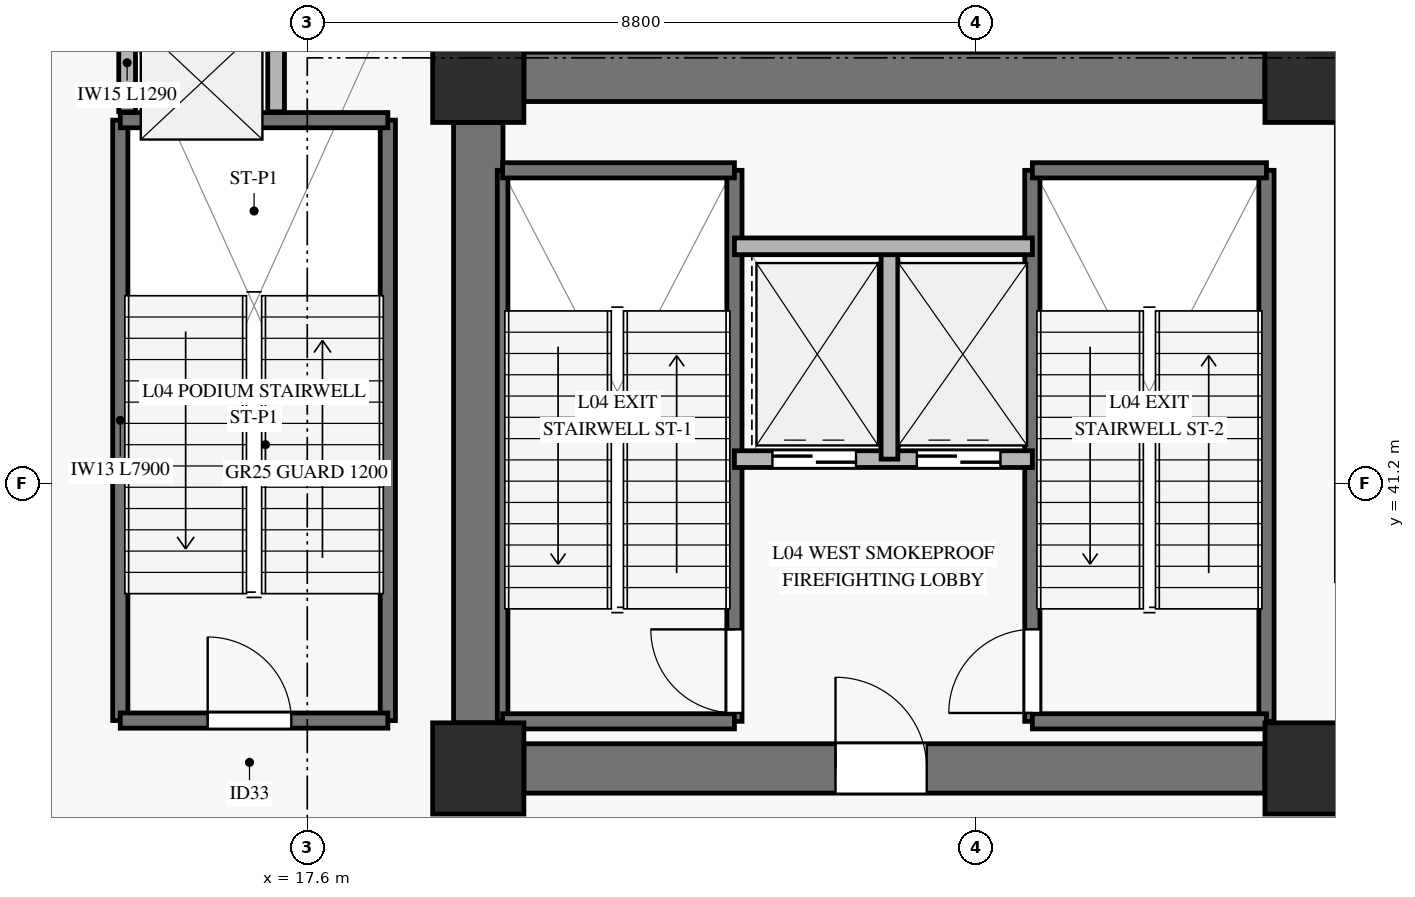
"""IFC4 building model, lengths in metres.
Left out: names, types, materials, properties, quantities, classifications, styles, units other than length and angle.
Written with IfcOpenShell. Run it as: python <this file> out.ifc"""

import sys

from ifc_helpers import new_model, si_unit, direction, frame, frame_2d, origin, origin_2d, place, context, subcontext, project, spatial, rectangle, extrude, source, transform, mapped, element, fill, save


model = new_model("IFC4")
c1 = context("Model", 3, precision=1e-05, world=origin(), true_north=direction((0.0, 1.0)))
c2 = subcontext(c1, "Body", "Model", "MODEL_VIEW")
j1 = project(units=[si_unit("LENGTHUNIT", "METRE"), si_unit("PLANEANGLEUNIT", "RADIAN")], contexts=[c1])
p1 = place(None, origin())
s1 = spatial("IfcSite", under=j1, at=p1, CompositionType="ELEMENT")
p2 = place(p1, origin())
s2 = spatial("IfcBuilding", under=s1, at=p2, CompositionType="ELEMENT")
p3 = place(p2, frame((0.0, 0.0, 15.2)))
s3 = spatial("IfcBuildingStorey", under=s2, at=p3, CompositionType="ELEMENT", Elevation=15.2)
m1 = source(origin(), c2, "Body", "SweptSolid", [
    extrude(rectangle(XDim=1.2, YDim=1.2, at=origin_2d()), origin(), (0.0, 0.0, 1.0), 4.65),
])
for number, where, z_axis, x_axis in (
    (1, (19.85, 37.45, 0.0), (0.0, 0.0, 1.0), (1.0, 0.0, 0.0)),
    (2, (19.85, 46.55, 0.0), (0.0, 0.0, 1.0), (1.0, 0.0, 0.0)),
    (3, (30.8, 37.45, 0.0), (0.0, 0.0, 1.0), (1.0, 0.0, 0.0)),
    (4, (30.8, 46.55, 0.0), (0.0, 0.0, 1.0), (1.0, 0.0, 0.0)),
):
    element("IfcColumn", number, at=place(p3, frame(where, z_axis=z_axis, x_axis=x_axis)), inside=s3, PredefinedType="PILASTER", context=c2, shape_type="MappedRepresentation", body=[
        mapped(m1, transform((0.0, 0.0, 0.0), x_axis=(1.0, 0.0, 0.0), y_axis=(0.0, 1.0, 0.0), z_axis=(0.0, 0.0, 1.0), scale=1.0)),
    ])
p4 = place(p3, frame((20.45, 46.55, 0.0), z_axis=(0.0, 0.0, 1.0), x_axis=(1.0, 0.0, 0.0)))
e5 = element("IfcWall", 5, at=p4, inside=s3, PredefinedType="SHEAR", context=c2, shape_type="SweptSolid", body=[
    extrude(rectangle(XDim=9.75, YDim=0.65, at=frame_2d((4.875, 0.0))), origin(), (0.0, 0.0, 1.0), 4.65),
])
p5 = place(p3, frame((20.45, 37.45, 0.0), z_axis=(0.0, 0.0, 1.0), x_axis=(1.0, 0.0, 0.0)))
e6 = element("IfcWall", 6, at=p5, inside=s3, PredefinedType="SHEAR", context=c2, shape_type="SweptSolid", body=[
    extrude(rectangle(XDim=9.75, YDim=0.65, at=frame_2d((4.875, 0.0))), origin(), (0.0, 0.0, 1.0), 4.65),
])
p6 = place(p5, frame((4.1, 0.0, 0.0)))
e7 = element("IfcOpeningElement", 7, at=p6, cuts=e6, PredefinedType="OPENING", context=c2, shape_type="SweptSolid", body=[
    extrude(rectangle(XDim=1.2, YDim=2.15, at=frame_2d((0.6, 1.075))), frame((0.0, 0.335, 0.0), z_axis=(0.0, -1.0, 0.0), x_axis=(1.0, 0.0, 0.0)), (0.0, 0.0, 1.0), 0.67),
])
p7 = place(p3, frame((19.85, 38.05, 0.0), z_axis=(0.0, 0.0, 1.0), x_axis=(0.0, 1.0, 0.0)))
e8 = element("IfcWall", 8, at=p7, inside=s3, PredefinedType="SHEAR", context=c2, shape_type="SweptSolid", body=[
    extrude(rectangle(XDim=7.9, YDim=0.65, at=frame_2d((3.95, 0.0))), origin(), (0.0, 0.0, 1.0), 4.65),
])
p8 = place(p3, frame((20.17, 38.07, 0.0), z_axis=(0.0, 0.0, 1.0), x_axis=(0.0, 1.0, 0.0)))
e9 = element("IfcWall", 9, at=p8, inside=s3, PredefinedType="SOLIDWALL", context=c2, shape_type="SweptSolid", body=[
    extrude(rectangle(XDim=7.25, YDim=0.14, at=frame_2d((3.625, 0.0))), origin(), (0.0, 0.0, 1.0), 5.0),
])
p9 = place(p3, frame((23.22, 38.07, 0.0), z_axis=(0.0, 0.0, 1.0), x_axis=(0.0, 1.0, 0.0)))
e10 = element("IfcWall", 10, at=p9, inside=s3, PredefinedType="SOLIDWALL", context=c2, shape_type="SweptSolid", body=[
    extrude(rectangle(XDim=7.25, YDim=0.2, at=frame_2d((3.625, 0.0))), origin(), (0.0, 0.0, 1.0), 5.0),
])
p10 = place(p9, frame((0.11, 0.0, 0.0)))
e11 = element("IfcOpeningElement", 11, at=p10, cuts=e10, PredefinedType="OPENING", context=c2, shape_type="SweptSolid", body=[
    extrude(rectangle(XDim=1.1, YDim=2.15, at=frame_2d((0.55, 1.075))), frame((0.0, 0.11, 0.0), z_axis=(0.0, -1.0, 0.0), x_axis=(1.0, 0.0, 0.0)), (0.0, 0.0, 1.0), 0.22),
])
for number, where, z_axis, x_axis in (
    (12, (20.17, 45.32, 0.0), (0.0, 0.0, 1.0), (1.0, 0.0, 0.0)),
    (13, (20.17, 38.07, 0.0), (0.0, 0.0, 1.0), (1.0, 0.0, 0.0)),
):
    element("IfcWall", number, at=place(p3, frame(where, z_axis=z_axis, x_axis=x_axis)), inside=s3, PredefinedType="SOLIDWALL", context=c2, shape_type="SweptSolid", body=[
        extrude(rectangle(XDim=3.05, YDim=0.2, at=frame_2d((1.525, 0.0))), origin(), (0.0, 0.0, 1.0), 5.0),
    ])
p11 = place(p3, frame((27.14, 38.07, 0.0), z_axis=(0.0, 0.0, 1.0), x_axis=(0.0, 1.0, 0.0)))
e14 = element("IfcWall", 14, at=p11, inside=s3, PredefinedType="SOLIDWALL", context=c2, shape_type="SweptSolid", body=[
    extrude(rectangle(XDim=7.25, YDim=0.2, at=frame_2d((3.625, 0.0))), origin(), (0.0, 0.0, 1.0), 5.0),
])
p12 = place(p11, frame((0.11, 0.0, 0.0)))
e15 = element("IfcOpeningElement", 15, at=p12, cuts=e14, PredefinedType="OPENING", context=c2, shape_type="SweptSolid", body=[
    extrude(rectangle(XDim=1.1, YDim=2.15, at=frame_2d((0.55, 1.075))), frame((0.0, 0.11, 0.0), z_axis=(0.0, -1.0, 0.0), x_axis=(1.0, 0.0, 0.0)), (0.0, 0.0, 1.0), 0.22),
])
p13 = place(p3, frame((30.22, 38.07, 0.0), z_axis=(0.0, 0.0, 1.0), x_axis=(0.0, 1.0, 0.0)))
e16 = element("IfcWall", 16, at=p13, inside=s3, PredefinedType="SOLIDWALL", context=c2, shape_type="SweptSolid", body=[
    extrude(rectangle(XDim=7.25, YDim=0.2, at=frame_2d((3.625, 0.0))), origin(), (0.0, 0.0, 1.0), 5.0),
])
for number, where, z_axis, x_axis in (
    (17, (27.14, 45.32, 0.0), (0.0, 0.0, 1.0), (1.0, 0.0, 0.0)),
    (18, (27.14, 38.07, 0.0), (0.0, 0.0, 1.0), (1.0, 0.0, 0.0)),
):
    element("IfcWall", number, at=place(p3, frame(where, z_axis=z_axis, x_axis=x_axis)), inside=s3, PredefinedType="SOLIDWALL", context=c2, shape_type="SweptSolid", body=[
        extrude(rectangle(XDim=3.08, YDim=0.2, at=frame_2d((1.54, 0.0))), origin(), (0.0, 0.0, 1.0), 5.0),
    ])
p14 = place(p3, frame((23.22, 41.52, 0.0), z_axis=(0.0, 0.0, 1.0), x_axis=(1.0, 0.0, 0.0)))
e19 = element("IfcWall", 19, at=p14, inside=s3, PredefinedType="SOLIDWALL", context=c2, shape_type="SweptSolid", body=[
    extrude(rectangle(XDim=3.92, YDim=0.22, at=frame_2d((1.96, 0.0))), origin(), (0.0, 0.0, 1.0), 4.65),
])
p15 = place(p14, frame((0.5, 0.0, 0.0)))
e20 = element("IfcOpeningElement", 20, at=p15, cuts=e19, PredefinedType="OPENING", context=c2, shape_type="SweptSolid", body=[
    extrude(rectangle(XDim=1.1, YDim=2.2, at=frame_2d((0.55, 1.1))), frame((0.0, 0.12, 0.0), z_axis=(0.0, -1.0, 0.0), x_axis=(1.0, 0.0, 0.0)), (0.0, 0.0, 1.0), 0.24),
])
p16 = place(p14, frame((2.4, 0.0, 0.0)))
e21 = element("IfcOpeningElement", 21, at=p16, cuts=e19, PredefinedType="OPENING", context=c2, shape_type="SweptSolid", body=[
    extrude(rectangle(XDim=1.1, YDim=2.2, at=frame_2d((0.55, 1.1))), frame((0.0, 0.12, 0.0), z_axis=(0.0, -1.0, 0.0), x_axis=(1.0, 0.0, 0.0)), (0.0, 0.0, 1.0), 0.24),
])
p17 = place(p3, frame((25.26, 41.52, 0.0), z_axis=(0.0, 0.0, 1.0), x_axis=(0.0, 1.0, 0.0)))
e22 = element("IfcWall", 22, at=p17, inside=s3, PredefinedType="SOLIDWALL", context=c2, shape_type="SweptSolid", body=[
    extrude(rectangle(XDim=2.8, YDim=0.22, at=frame_2d((1.4, 0.0))), origin(), (0.0, 0.0, 1.0), 4.65),
])
p18 = place(p3, frame((23.22, 44.32, 0.0), z_axis=(0.0, 0.0, 1.0), x_axis=(1.0, 0.0, 0.0)))
e23 = element("IfcWall", 23, at=p18, inside=s3, PredefinedType="SOLIDWALL", context=c2, shape_type="SweptSolid", body=[
    extrude(rectangle(XDim=3.92, YDim=0.22, at=frame_2d((1.96, 0.0))), origin(), (0.0, 0.0, 1.0), 4.65),
])
for number, where, z_axis, x_axis in (
    (24, (15.14, 38.08, 0.0), (0.0, 0.0, 1.0), (0.0, 1.0, 0.0)),
    (25, (18.66, 38.08, 0.0), (0.0, 0.0, 1.0), (0.0, 1.0, 0.0)),
):
    element("IfcWall", number, at=place(p3, frame(where, z_axis=z_axis, x_axis=x_axis)), inside=s3, PredefinedType="SOLIDWALL", context=c2, shape_type="SweptSolid", body=[
        extrude(rectangle(XDim=7.9, YDim=0.2, at=frame_2d((3.95, 0.0))), origin(), (0.0, 0.0, 1.0), 5.0),
    ])
p19 = place(p3, frame((15.14, 45.98, 0.0), z_axis=(0.0, 0.0, 1.0), x_axis=(1.0, 0.0, 0.0)))
e26 = element("IfcWall", 26, at=p19, inside=s3, PredefinedType="SOLIDWALL", context=c2, shape_type="SweptSolid", body=[
    extrude(rectangle(XDim=3.52, YDim=0.2, at=frame_2d((1.76, 0.0))), origin(), (0.0, 0.0, 1.0), 5.0),
])
p20 = place(p3, frame((15.14, 38.08, 0.0), z_axis=(0.0, 0.0, 1.0), x_axis=(1.0, 0.0, 0.0)))
e27 = element("IfcWall", 27, at=p20, inside=s3, PredefinedType="SOLIDWALL", context=c2, shape_type="SweptSolid", body=[
    extrude(rectangle(XDim=3.52, YDim=0.2, at=frame_2d((1.76, 0.0))), origin(), (0.0, 0.0, 1.0), 5.0),
])
p21 = place(p20, frame((1.15, 0.0, 0.0)))
e28 = element("IfcOpeningElement", 28, at=p21, cuts=e27, PredefinedType="OPENING", context=c2, shape_type="SweptSolid", body=[
    extrude(rectangle(XDim=1.1, YDim=2.15, at=frame_2d((0.55, 1.075))), frame((0.0, 0.11, 0.0), z_axis=(0.0, -1.0, 0.0), x_axis=(1.0, 0.0, 0.0)), (0.0, 0.0, 1.0), 0.22),
])
for number, where, z_axis, x_axis in (
    (29, (15.23, 46.09, 0.0), (0.0, 0.0, 1.0), (0.0, 1.0, 0.0)),
    (30, (17.19, 46.09, 0.0), (0.0, 0.0, 1.0), (0.0, 1.0, 0.0)),
):
    element("IfcWall", number, at=place(p3, frame(where, z_axis=z_axis, x_axis=x_axis)), inside=s3, PredefinedType="SOLIDWALL", context=c2, shape_type="SweptSolid", body=[
        extrude(rectangle(XDim=1.29, YDim=0.22, at=frame_2d((0.645, 0.0))), origin(), (0.0, 0.0, 1.0), 4.65),
    ])
m2 = source(origin(), c2, "Body", "SweptSolid", [
    extrude(rectangle(XDim=1.1, YDim=2.15, at=frame_2d((0.55, 1.075))), frame((0.0, 0.025, 0.0), z_axis=(0.0, -1.0, 0.0), x_axis=(1.0, 0.0, 0.0)), (0.0, 0.0, 1.0), 0.05),
])
p22 = place(p10, origin())
e31 = element("IfcDoor", 31, at=p22, inside=s3, OperationType="SINGLE_SWING_RIGHT", PredefinedType="DOOR", context=c2, shape_type="MappedRepresentation", body=[
    mapped(m2, transform((0.0, 0.0, 0.0), x_axis=(1.0, 0.0, 0.0), y_axis=(0.0, 1.0, 0.0), z_axis=(0.0, 0.0, 1.0), scale=1.0)),
])
fill(e11, e31)
p23 = place(p12, origin())
e32 = element("IfcDoor", 32, at=p23, inside=s3, OperationType="SINGLE_SWING_LEFT", PredefinedType="DOOR", context=c2, shape_type="MappedRepresentation", body=[
    mapped(m2, transform((0.0, 0.0, 0.0), x_axis=(1.0, 0.0, 0.0), y_axis=(0.0, 1.0, 0.0), z_axis=(0.0, 0.0, 1.0), scale=1.0)),
])
fill(e15, e32)
m3 = source(origin(), c2, "Body", "SweptSolid", [
    extrude(rectangle(XDim=1.1, YDim=2.2, at=frame_2d((0.55, 1.1))), frame((0.0, 0.025, 0.0), z_axis=(0.0, -1.0, 0.0), x_axis=(1.0, 0.0, 0.0)), (0.0, 0.0, 1.0), 0.05),
])
p24 = place(p15, origin())
e33 = element("IfcDoor", 33, at=p24, inside=s3, OperationType="SLIDING_TO_LEFT", PredefinedType="DOOR", context=c2, shape_type="MappedRepresentation", body=[
    mapped(m3, transform((0.0, 0.0, 0.0), x_axis=(1.0, 0.0, 0.0), y_axis=(0.0, 1.0, 0.0), z_axis=(0.0, 0.0, 1.0), scale=1.0)),
])
fill(e20, e33)
p25 = place(p16, origin())
e34 = element("IfcDoor", 34, at=p25, inside=s3, OperationType="SLIDING_TO_LEFT", PredefinedType="DOOR", context=c2, shape_type="MappedRepresentation", body=[
    mapped(m3, transform((0.0, 0.0, 0.0), x_axis=(1.0, 0.0, 0.0), y_axis=(0.0, 1.0, 0.0), z_axis=(0.0, 0.0, 1.0), scale=1.0)),
])
fill(e21, e34)
m4 = source(origin(), c2, "Body", "SweptSolid", [
    extrude(rectangle(XDim=1.2, YDim=2.15, at=frame_2d((0.6, 1.075))), frame((0.0, 0.025, 0.0), z_axis=(0.0, -1.0, 0.0), x_axis=(1.0, 0.0, 0.0)), (0.0, 0.0, 1.0), 0.05),
])
p26 = place(p6, origin())
e35 = element("IfcDoor", 35, at=p26, inside=s3, OperationType="SINGLE_SWING_LEFT", PredefinedType="DOOR", context=c2, shape_type="MappedRepresentation", body=[
    mapped(m4, transform((0.0, 0.0, 0.0), x_axis=(1.0, 0.0, 0.0), y_axis=(0.0, 1.0, 0.0), z_axis=(0.0, 0.0, 1.0), scale=1.0)),
])
fill(e7, e35)
p27 = place(p21, origin())
e36 = element("IfcDoor", 36, at=p27, inside=s3, OperationType="SINGLE_SWING_LEFT", PredefinedType="DOOR", context=c2, shape_type="MappedRepresentation", body=[
    mapped(m2, transform((0.0, 0.0, 0.0), x_axis=(1.0, 0.0, 0.0), y_axis=(0.0, 1.0, 0.0), z_axis=(0.0, 0.0, 1.0), scale=1.0)),
])
fill(e28, e36)
save(model, sys.argv[1])
